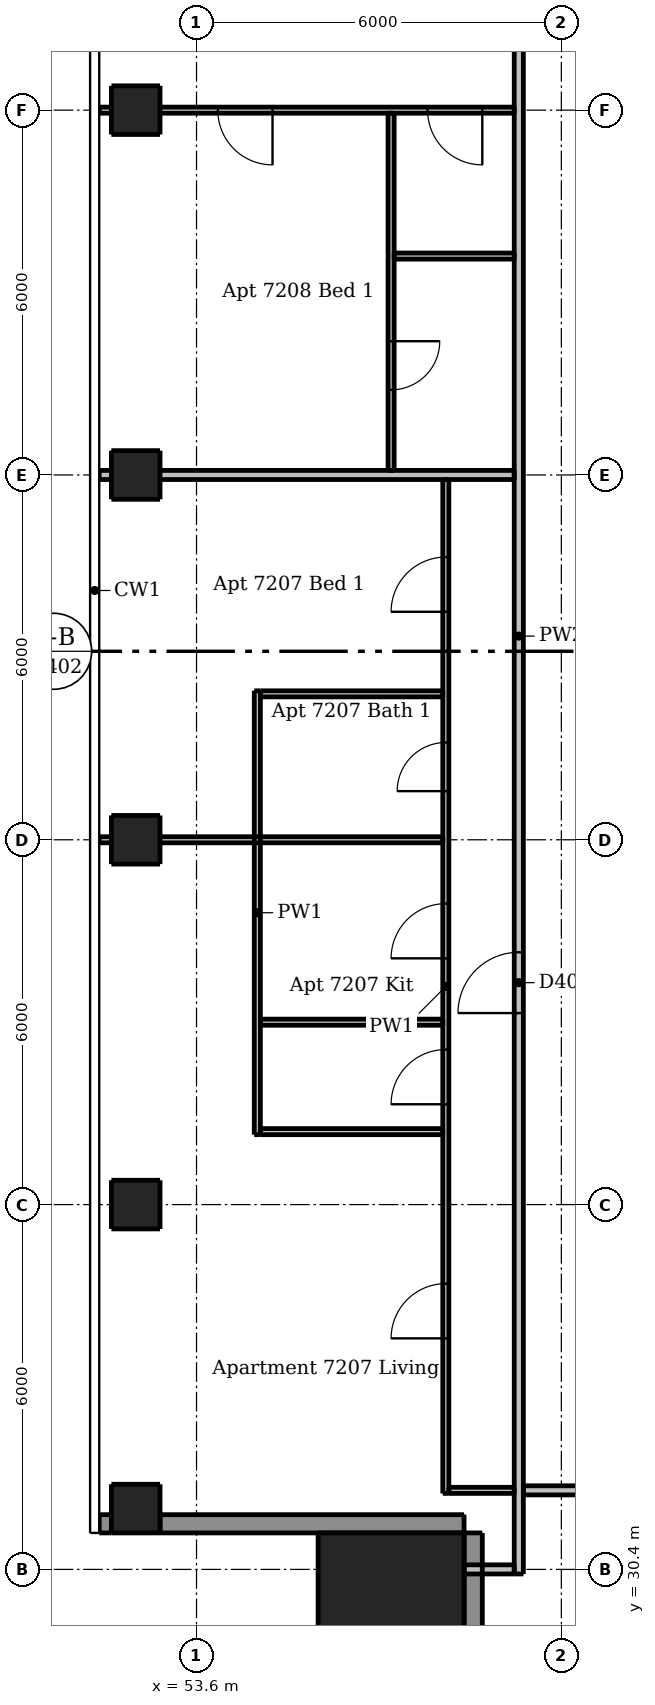
"""IFC4 building model, lengths in metres.
Left out: names, types, materials, properties, quantities, classifications, styles, units other than length and angle.
Written with IfcOpenShell. Run it as: python <this file> out.ifc"""

import sys

from ifc_helpers import new_model, si_unit, direction, frame, frame_2d, origin, origin_2d, place, context, subcontext, project, spatial, rectangle, extrude, element, fill, save


model = new_model("IFC4")
c1 = context("Model", 3, precision=1e-05, world=origin(), true_north=direction((0.0, 1.0)))
c2 = subcontext(c1, "Body", "Model", "MODEL_VIEW")
j1 = project(units=[si_unit("LENGTHUNIT", "METRE"), si_unit("PLANEANGLEUNIT", "RADIAN")], contexts=[c1])
p1 = place(None, origin())
s1 = spatial("IfcSite", under=j1, at=p1, CompositionType="ELEMENT")
p2 = place(p1, origin())
s2 = spatial("IfcBuilding", under=s1, at=p2, CompositionType="ELEMENT")
p3 = place(p2, frame((0.0, 0.0, 268.6)))
s3 = spatial("IfcBuildingStorey", under=s2, at=p3, CompositionType="ELEMENT", Elevation=268.6)
for number, where, z_axis, x_axis in (
    (1, (52.6, 31.4, 0.0), (0.0, 0.0, 1.0), (1.0, 0.0, 0.0)),
    (2, (52.6, 36.4, 0.0), (0.0, 0.0, 1.0), (1.0, 0.0, 0.0)),
    (3, (52.6, 42.4, 0.0), (0.0, 0.0, 1.0), (1.0, 0.0, 0.0)),
    (4, (52.6, 48.4, 0.0), (0.0, 0.0, 1.0), (1.0, 0.0, 0.0)),
    (5, (52.6, 54.4, 0.0), (0.0, 0.0, 1.0), (1.0, 0.0, 0.0)),
):
    element("IfcColumn", number, at=place(p3, frame(where, z_axis=z_axis, x_axis=x_axis)), inside=s3, PredefinedType="COLUMN", context=c2, shape_type="SweptSolid", body=[
        extrude(rectangle(XDim=0.8, YDim=0.8, at=origin_2d()), origin(), (0.0, 0.0, 1.0), 3.05),
    ])
p4 = place(p3, frame((56.8, 29.8, 0.0), z_axis=(0.0, 0.0, 1.0), x_axis=(1.0, 0.0, 0.0)))
e6 = element("IfcColumn", 6, at=p4, inside=s3, PredefinedType="COLUMN", context=c2, shape_type="SweptSolid", body=[
    extrude(rectangle(XDim=2.4, YDim=2.4, at=origin_2d()), origin(), (0.0, 0.0, 1.0), 3.3),
])
p5 = place(p3, frame((52.0, 31.15, 0.0), z_axis=(0.0, 0.0, 1.0), x_axis=(1.0, 0.0, 0.0)))
e7 = element("IfcWall", 7, at=p5, inside=s3, PredefinedType="SOLIDWALL", context=c2, shape_type="SweptSolid", body=[
    extrude(rectangle(XDim=0.2, YDim=0.3, at=frame_2d((0.1, 0.0))), origin(), (0.0, 0.0, 1.0), 3.05),
])
p6 = place(p3, frame((53.0, 31.15, 0.0), z_axis=(0.0, 0.0, 1.0), x_axis=(1.0, 0.0, 0.0)))
e8 = element("IfcWall", 8, at=p6, inside=s3, PredefinedType="SOLIDWALL", context=c2, shape_type="SweptSolid", body=[
    extrude(rectangle(XDim=5.0, YDim=0.3, at=frame_2d((2.5, 0.0))), origin(), (0.0, 0.0, 1.0), 3.05),
])
p7 = place(p3, frame((58.15, 31.0, 0.0), z_axis=(0.0, 0.0, 1.0), x_axis=(0.0, -1.0, 0.0)))
e9 = element("IfcWall", 9, at=p7, inside=s3, PredefinedType="SOLIDWALL", context=c2, shape_type="SweptSolid", body=[
    extrude(rectangle(XDim=6.0, YDim=0.3, at=frame_2d((3.0, 0.0))), origin(), (0.0, 0.0, 1.0), 3.05),
])
p8 = place(p7, frame((1.8, 0.0, 0.15)))
e10 = element("IfcOpeningElement", 10, at=p8, cuts=e9, PredefinedType="OPENING", context=c2, shape_type="SweptSolid", body=[
    extrude(rectangle(XDim=2.4, YDim=2.1, at=frame_2d((1.2, 1.05))), frame((0.0, 0.16, 0.0), z_axis=(0.0, -1.0, 0.0), x_axis=(1.0, 0.0, 0.0)), (0.0, 0.0, 1.0), 0.32),
])
p9 = place(p3, frame((54.6, 37.55, 0.0), z_axis=(0.0, 0.0, 1.0), x_axis=(0.0, 1.0, 0.0)))
e11 = element("IfcWall", 11, at=p9, inside=s3, PredefinedType="PARTITIONING", context=c2, shape_type="SweptSolid", body=[
    extrude(rectangle(XDim=7.3, YDim=0.1, at=frame_2d((3.65, 0.0))), origin(), (0.0, 0.0, 1.0), 3.05),
])
p10 = place(p3, frame((56.8, 54.35, 0.0), z_axis=(0.0, 0.0, 1.0), x_axis=(0.0, -1.0, 0.0)))
e12 = element("IfcWall", 12, at=p10, inside=s3, PredefinedType="PARTITIONING", context=c2, shape_type="SweptSolid", body=[
    extrude(rectangle(XDim=5.875, YDim=0.1, at=frame_2d((2.938, 0.0))), origin(), (0.0, 0.0, 1.0), 3.05),
])
p11 = place(p10, frame((3.75, 0.0, 0.0)))
e13 = element("IfcOpeningElement", 13, at=p11, cuts=e12, PredefinedType="OPENING", context=c2, shape_type="SweptSolid", body=[
    extrude(rectangle(XDim=0.8, YDim=2.1, at=frame_2d((0.4, 1.05))), frame((0.0, 0.06, 0.0), z_axis=(0.0, -1.0, 0.0), x_axis=(1.0, 0.0, 0.0)), (0.0, 0.0, 1.0), 0.12),
])
p12 = place(p3, frame((57.7, 31.65, 0.0), z_axis=(0.0, 0.0, 1.0), x_axis=(0.0, 1.0, 0.0)))
e14 = element("IfcWall", 14, at=p12, inside=s3, PredefinedType="PARTITIONING", context=c2, shape_type="SweptSolid", body=[
    extrude(rectangle(XDim=16.675, YDim=0.1, at=frame_2d((8.337, 0.0))), origin(), (0.0, 0.0, 1.0), 3.05),
])
p13 = place(p12, frame((2.55, 0.0, 0.0)))
e15 = element("IfcOpeningElement", 15, at=p13, cuts=e14, PredefinedType="OPENING", context=c2, shape_type="SweptSolid", body=[
    extrude(rectangle(XDim=0.9, YDim=2.1, at=frame_2d((0.45, 1.05))), frame((0.0, 0.06, 0.0), z_axis=(0.0, -1.0, 0.0), x_axis=(1.0, 0.0, 0.0)), (0.0, 0.0, 1.0), 0.12),
])
p14 = place(p12, frame((8.8, 0.0, 0.0)))
e16 = element("IfcOpeningElement", 16, at=p14, cuts=e14, PredefinedType="OPENING", context=c2, shape_type="SweptSolid", body=[
    extrude(rectangle(XDim=0.9, YDim=2.1, at=frame_2d((0.45, 1.05))), frame((0.0, 0.06, 0.0), z_axis=(0.0, -1.0, 0.0), x_axis=(1.0, 0.0, 0.0)), (0.0, 0.0, 1.0), 0.12),
])
p15 = place(p12, frame((6.4, 0.0, 0.0)))
e17 = element("IfcOpeningElement", 17, at=p15, cuts=e14, PredefinedType="OPENING", context=c2, shape_type="SweptSolid", body=[
    extrude(rectangle(XDim=0.9, YDim=2.1, at=frame_2d((0.45, 1.05))), frame((0.0, 0.06, 0.0), z_axis=(0.0, -1.0, 0.0), x_axis=(1.0, 0.0, 0.0)), (0.0, 0.0, 1.0), 0.12),
])
p16 = place(p12, frame((14.5, 0.0, 0.0)))
e18 = element("IfcOpeningElement", 18, at=p16, cuts=e14, PredefinedType="OPENING", context=c2, shape_type="SweptSolid", body=[
    extrude(rectangle(XDim=0.9, YDim=2.1, at=frame_2d((0.45, 1.05))), frame((0.0, 0.06, 0.0), z_axis=(0.0, -1.0, 0.0), x_axis=(1.0, 0.0, 0.0)), (0.0, 0.0, 1.0), 0.12),
])
p17 = place(p12, frame((11.55, 0.0, 0.0)))
e19 = element("IfcOpeningElement", 19, at=p17, cuts=e14, PredefinedType="OPENING", context=c2, shape_type="SweptSolid", body=[
    extrude(rectangle(XDim=0.8, YDim=2.1, at=frame_2d((0.4, 1.05))), frame((0.0, 0.06, 0.0), z_axis=(0.0, -1.0, 0.0), x_axis=(1.0, 0.0, 0.0)), (0.0, 0.0, 1.0), 0.12),
])
p18 = place(p3, frame((58.825, 54.4, 0.0), z_axis=(0.0, 0.0, 1.0), x_axis=(-1.0, 0.0, 0.0)))
e20 = element("IfcWall", 20, at=p18, inside=s3, PredefinedType="PARTITIONING", context=c2, shape_type="SweptSolid", body=[
    extrude(rectangle(XDim=6.825, YDim=0.1, at=frame_2d((3.413, 0.0))), origin(), (0.0, 0.0, 1.0), 2.516),
])
p19 = place(p18, frame((0.525, 0.0, 0.0)))
e21 = element("IfcOpeningElement", 21, at=p19, cuts=e20, PredefinedType="OPENING", context=c2, shape_type="SweptSolid", body=[
    extrude(rectangle(XDim=0.9, YDim=2.1, at=frame_2d((0.45, 1.05))), frame((0.0, 0.06, 0.0), z_axis=(0.0, -1.0, 0.0), x_axis=(1.0, 0.0, 0.0)), (0.0, 0.0, 1.0), 0.12),
])
p20 = place(p18, frame((3.975, 0.0, 0.0)))
e22 = element("IfcOpeningElement", 22, at=p20, cuts=e20, PredefinedType="OPENING", context=c2, shape_type="SweptSolid", body=[
    extrude(rectangle(XDim=0.9, YDim=2.1, at=frame_2d((0.45, 1.05))), frame((0.0, 0.06, 0.0), z_axis=(0.0, -1.0, 0.0), x_axis=(1.0, 0.0, 0.0)), (0.0, 0.0, 1.0), 0.12),
])
p21 = place(p3, frame((56.85, 52.0, 0.0), z_axis=(0.0, 0.0, 1.0), x_axis=(1.0, 0.0, 0.0)))
e23 = element("IfcWall", 23, at=p21, inside=s3, PredefinedType="PARTITIONING", context=c2, shape_type="SweptSolid", body=[
    extrude(rectangle(XDim=1.975, YDim=0.1, at=frame_2d((0.987, 0.0))), origin(), (0.0, 0.0, 1.0), 3.05),
])
p22 = place(p3, frame((54.65, 44.8, 0.0), z_axis=(0.0, 0.0, 1.0), x_axis=(1.0, 0.0, 0.0)))
e24 = element("IfcWall", 24, at=p22, inside=s3, PredefinedType="PARTITIONING", context=c2, shape_type="SweptSolid", body=[
    extrude(rectangle(XDim=3.0, YDim=0.1, at=frame_2d((1.5, 0.0))), origin(), (0.0, 0.0, 1.0), 3.05),
])
p23 = place(p3, frame((52.0, 42.4, 0.0), z_axis=(0.0, 0.0, 1.0), x_axis=(1.0, 0.0, 0.0)))
e25 = element("IfcWall", 25, at=p23, inside=s3, PredefinedType="PARTITIONING", context=c2, shape_type="SweptSolid", body=[
    extrude(rectangle(XDim=5.65, YDim=0.1, at=frame_2d((2.825, 0.0))), origin(), (0.0, 0.0, 1.0), 2.516),
])
for number, where, z_axis, x_axis in (
    (26, (54.65, 39.4, 0.0), (0.0, 0.0, 1.0), (1.0, 0.0, 0.0)),
    (27, (54.65, 37.6, 0.0), (0.0, 0.0, 1.0), (1.0, 0.0, 0.0)),
):
    element("IfcWall", number, at=place(p3, frame(where, z_axis=z_axis, x_axis=x_axis)), inside=s3, PredefinedType="PARTITIONING", context=c2, shape_type="SweptSolid", body=[
        extrude(rectangle(XDim=3.0, YDim=0.1, at=frame_2d((1.5, 0.0))), origin(), (0.0, 0.0, 1.0), 3.05),
    ])
p24 = place(p3, frame((57.75, 31.7, 0.0), z_axis=(0.0, 0.0, 1.0), x_axis=(1.0, 0.0, 0.0)))
e28 = element("IfcWall", 28, at=p24, inside=s3, PredefinedType="PARTITIONING", context=c2, shape_type="SweptSolid", body=[
    extrude(rectangle(XDim=1.075, YDim=0.1, at=frame_2d((0.538, 0.0))), origin(), (0.0, 0.0, 1.0), 3.05),
])
p25 = place(p3, frame((58.9, 30.325, 0.0), z_axis=(0.0, 0.0, 1.0), x_axis=(0.0, 1.0, 0.0)))
e29 = element("IfcWall", 29, at=p25, inside=s3, PredefinedType="PARTITIONING", context=c2, shape_type="SweptSolid", body=[
    extrude(rectangle(XDim=30.85, YDim=0.15, at=frame_2d((15.425, 0.0))), origin(), (0.0, 0.0, 1.0), 3.05),
])
p26 = place(p25, frame((9.225, 0.0, 0.0)))
e30 = element("IfcOpeningElement", 30, at=p26, cuts=e29, PredefinedType="OPENING", context=c2, shape_type="SweptSolid", body=[
    extrude(rectangle(XDim=1.0, YDim=2.1, at=frame_2d((0.5, 1.05))), frame((0.0, 0.085, 0.0), z_axis=(0.0, -1.0, 0.0), x_axis=(1.0, 0.0, 0.0)), (0.0, 0.0, 1.0), 0.17),
])
p27 = place(p25, frame((26.925, 0.0, 0.0)))
e31 = element("IfcOpeningElement", 31, at=p27, cuts=e29, PredefinedType="OPENING", context=c2, shape_type="SweptSolid", body=[
    extrude(rectangle(XDim=1.0, YDim=2.1, at=frame_2d((0.5, 1.05))), frame((0.0, 0.085, 0.0), z_axis=(0.0, -1.0, 0.0), x_axis=(1.0, 0.0, 0.0)), (0.0, 0.0, 1.0), 0.17),
])
p28 = place(p3, frame((52.0, 48.4, 0.0), z_axis=(0.0, 0.0, 1.0), x_axis=(1.0, 0.0, 0.0)))
e32 = element("IfcWall", 32, at=p28, inside=s3, PredefinedType="PARTITIONING", context=c2, shape_type="SweptSolid", body=[
    extrude(rectangle(XDim=6.825, YDim=0.15, at=frame_2d((3.413, 0.0))), origin(), (0.0, 0.0, 1.0), 2.516),
])
p29 = place(p3, frame((89.525, 31.7, 0.0), z_axis=(0.0, 0.0, 1.0), x_axis=(-1.0, 0.0, 0.0)))
e33 = element("IfcWall", 33, at=p29, inside=s3, PredefinedType="PARTITIONING", context=c2, shape_type="SweptSolid", body=[
    extrude(rectangle(XDim=30.55, YDim=0.15, at=frame_2d((15.275, 0.0))), origin(), (0.0, 0.0, 1.0), 3.05),
])
p30 = place(p29, frame((28.275, 0.0, 0.0)))
e34 = element("IfcOpeningElement", 34, at=p30, cuts=e33, PredefinedType="OPENING", context=c2, shape_type="SweptSolid", body=[
    extrude(rectangle(XDim=1.0, YDim=2.1, at=frame_2d((0.5, 1.05))), frame((0.0, 0.085, 0.0), z_axis=(0.0, -1.0, 0.0), x_axis=(1.0, 0.0, 0.0)), (0.0, 0.0, 1.0), 0.17),
])
p31 = place(p29, frame((11.425, 0.0, 0.0)))
e35 = element("IfcOpeningElement", 35, at=p31, cuts=e33, PredefinedType="OPENING", context=c2, shape_type="SweptSolid", body=[
    extrude(rectangle(XDim=1.0, YDim=2.1, at=frame_2d((0.5, 1.05))), frame((0.0, 0.085, 0.0), z_axis=(0.0, -1.0, 0.0), x_axis=(1.0, 0.0, 0.0)), (0.0, 0.0, 1.0), 0.17),
])
p32 = place(p3, frame((58.0, 30.4, 0.0), z_axis=(0.0, 0.0, 1.0), x_axis=(1.0, 0.0, 0.0)))
e36 = element("IfcWall", 36, at=p32, inside=s3, PredefinedType="PARTITIONING", context=c2, shape_type="SweptSolid", body=[
    extrude(rectangle(XDim=0.825, YDim=0.15, at=frame_2d((0.413, 0.0))), origin(), (0.0, 0.0, 1.0), 3.05),
])
p33 = place(p26, origin())
e37 = element("IfcDoor", 37, at=p33, inside=s3, OperationType="SINGLE_SWING_LEFT", PredefinedType="DOOR", context=c2, shape_type="SweptSolid", body=[
    extrude(rectangle(XDim=1.0, YDim=2.1, at=frame_2d((0.5, 1.05))), frame((0.0, 0.025, 0.0), z_axis=(0.0, -1.0, 0.0), x_axis=(1.0, 0.0, 0.0)), (0.0, 0.0, 1.0), 0.05),
])
fill(e30, e37)
p34 = place(p13, origin())
e38 = element("IfcDoor", 38, at=p34, inside=s3, OperationType="SINGLE_SWING_LEFT", PredefinedType="DOOR", context=c2, shape_type="SweptSolid", body=[
    extrude(rectangle(XDim=0.9, YDim=2.1, at=frame_2d((0.45, 1.05))), frame((0.0, 0.025, 0.0), z_axis=(0.0, -1.0, 0.0), x_axis=(1.0, 0.0, 0.0)), (0.0, 0.0, 1.0), 0.05),
])
fill(e15, e38)
p35 = place(p14, origin())
e39 = element("IfcDoor", 39, at=p35, inside=s3, OperationType="SINGLE_SWING_LEFT", PredefinedType="DOOR", context=c2, shape_type="SweptSolid", body=[
    extrude(rectangle(XDim=0.9, YDim=2.1, at=frame_2d((0.45, 1.05))), frame((0.0, 0.025, 0.0), z_axis=(0.0, -1.0, 0.0), x_axis=(1.0, 0.0, 0.0)), (0.0, 0.0, 1.0), 0.05),
])
fill(e16, e39)
p36 = place(p15, origin())
e40 = element("IfcDoor", 40, at=p36, inside=s3, OperationType="SINGLE_SWING_LEFT", PredefinedType="DOOR", context=c2, shape_type="SweptSolid", body=[
    extrude(rectangle(XDim=0.9, YDim=2.1, at=frame_2d((0.45, 1.05))), frame((0.0, 0.025, 0.0), z_axis=(0.0, -1.0, 0.0), x_axis=(1.0, 0.0, 0.0)), (0.0, 0.0, 1.0), 0.05),
])
fill(e17, e40)
p37 = place(p16, origin())
e41 = element("IfcDoor", 41, at=p37, inside=s3, OperationType="SINGLE_SWING_LEFT", PredefinedType="DOOR", context=c2, shape_type="SweptSolid", body=[
    extrude(rectangle(XDim=0.9, YDim=2.1, at=frame_2d((0.45, 1.05))), frame((0.0, 0.025, 0.0), z_axis=(0.0, -1.0, 0.0), x_axis=(1.0, 0.0, 0.0)), (0.0, 0.0, 1.0), 0.05),
])
fill(e18, e41)
p38 = place(p17, origin())
e42 = element("IfcDoor", 42, at=p38, inside=s3, OperationType="SINGLE_SWING_LEFT", PredefinedType="DOOR", context=c2, shape_type="SweptSolid", body=[
    extrude(rectangle(XDim=0.8, YDim=2.1, at=frame_2d((0.4, 1.05))), frame((0.0, 0.025, 0.0), z_axis=(0.0, -1.0, 0.0), x_axis=(1.0, 0.0, 0.0)), (0.0, 0.0, 1.0), 0.05),
])
fill(e19, e42)
p39 = place(p19, origin())
e43 = element("IfcDoor", 43, at=p39, inside=s3, OperationType="SINGLE_SWING_LEFT", PredefinedType="DOOR", context=c2, shape_type="SweptSolid", body=[
    extrude(rectangle(XDim=0.9, YDim=2.1, at=frame_2d((0.45, 1.05))), frame((0.0, 0.025, 0.0), z_axis=(0.0, -1.0, 0.0), x_axis=(1.0, 0.0, 0.0)), (0.0, 0.0, 1.0), 0.05),
])
fill(e21, e43)
p40 = place(p20, origin())
e44 = element("IfcDoor", 44, at=p40, inside=s3, OperationType="SINGLE_SWING_LEFT", PredefinedType="DOOR", context=c2, shape_type="SweptSolid", body=[
    extrude(rectangle(XDim=0.9, YDim=2.1, at=frame_2d((0.45, 1.05))), frame((0.0, 0.025, 0.0), z_axis=(0.0, -1.0, 0.0), x_axis=(1.0, 0.0, 0.0)), (0.0, 0.0, 1.0), 0.05),
])
fill(e22, e44)
p41 = place(p11, origin())
e45 = element("IfcDoor", 45, at=p41, inside=s3, OperationType="SINGLE_SWING_LEFT", PredefinedType="DOOR", context=c2, shape_type="SweptSolid", body=[
    extrude(rectangle(XDim=0.8, YDim=2.1, at=frame_2d((0.4, 1.05))), frame((0.0, 0.025, 0.0), z_axis=(0.0, -1.0, 0.0), x_axis=(1.0, 0.0, 0.0)), (0.0, 0.0, 1.0), 0.05),
])
fill(e13, e45)
save(model, sys.argv[1])
